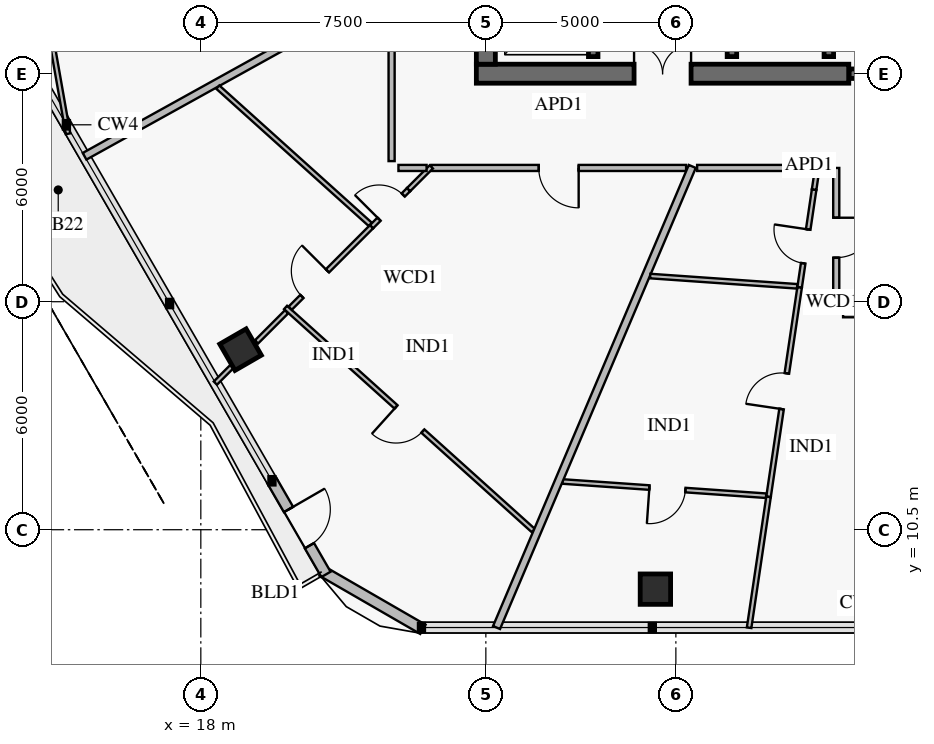
"""IFC4 building model, lengths in metres.
Left out: names, types, materials, properties, quantities, classifications, styles, units other than length and angle.
Written with IfcOpenShell. Run it as: python <this file> out.ifc"""

import sys

from ifc_helpers import new_model, si_unit, direction, frame, frame_2d, origin, origin_2d, place, context, subcontext, project, spatial, rectangle, extrude, element, fill, save


model = new_model("IFC4")
c1 = context("Model", 3, precision=1e-05, world=origin(), true_north=direction((0.0, 1.0)))
c2 = subcontext(c1, "Body", "Model", "MODEL_VIEW")
j1 = project(units=[si_unit("LENGTHUNIT", "METRE"), si_unit("PLANEANGLEUNIT", "RADIAN")], contexts=[c1])
p1 = place(None, origin())
s1 = spatial("IfcSite", under=j1, at=p1, CompositionType="ELEMENT")
p2 = place(p1, origin())
s2 = spatial("IfcBuilding", under=s1, at=p2, CompositionType="ELEMENT")
p3 = place(p2, frame((0.0, 0.0, 331.0)))
s3 = spatial("IfcBuildingStorey", under=s2, at=p3, CompositionType="ELEMENT", Elevation=331.0)
p4 = place(p3, frame((25.25, 22.5, 0.0), z_axis=(0.0, 0.0, 1.0), x_axis=(1.0, 0.0, 0.0)))
e1 = element("IfcWall", 1, at=p4, inside=s3, PredefinedType="SHEAR", context=c2, shape_type="SweptSolid", body=[
    extrude(rectangle(XDim=9.8, YDim=0.5, at=frame_2d((4.9, 0.0))), origin(), (0.0, 0.0, 1.0), 3.8),
])
p5 = place(p4, frame((4.15, 0.0, 0.0)))
e2 = element("IfcOpeningElement", 2, at=p5, cuts=e1, PredefinedType="OPENING", context=c2, shape_type="SweptSolid", body=[
    extrude(rectangle(XDim=1.5, YDim=2.15, at=frame_2d((0.75, 1.075))), frame((0.0, 0.262, 0.0), z_axis=(0.0, -1.0, 0.0), x_axis=(1.0, 0.0, 0.0)), (0.0, 0.0, 1.0), 0.524),
])
p6 = place(p3, frame((25.5, 22.75, 0.0), z_axis=(0.0, 0.0, 1.0), x_axis=(0.0, 1.0, 0.0)))
e3 = element("IfcWall", 3, at=p6, inside=s3, PredefinedType="SHEAR", context=c2, shape_type="SweptSolid", body=[
    extrude(rectangle(XDim=18.5, YDim=0.5, at=frame_2d((9.25, 0.0))), origin(), (0.0, 0.0, 1.0), 3.8),
])
p7 = place(p6, frame((9.0, 0.0, 0.0)))
e4 = element("IfcOpeningElement", 4, at=p7, cuts=e3, PredefinedType="OPENING", context=c2, shape_type="SweptSolid", body=[
    extrude(rectangle(XDim=1.1, YDim=2.15, at=frame_2d((0.55, 1.075))), frame((0.0, 0.262, 0.0), z_axis=(0.0, -1.0, 0.0), x_axis=(1.0, 0.0, 0.0)), (0.0, 0.0, 1.0), 0.524),
])
for number, where, z_axis, x_axis in (
    (5, (19.045, 15.238, 0.0), (0.0, 0.0, 1.0), (0.5, -0.866, 0.0)),
    (6, (29.961, 8.936, 0.0), (0.0, 0.0, 1.0), (1.0, 0.0, 0.0)),
):
    element("IfcColumn", number, at=place(p3, frame(where, z_axis=z_axis, x_axis=x_axis)), inside=s3, PredefinedType="COLUMN", context=c2, shape_type="SweptSolid", body=[
        extrude(rectangle(XDim=0.8, YDim=0.8, at=origin_2d()), origin(), (0.0, 0.0, 1.0), 3.55),
    ])
p8 = place(p3, frame((23.843, 7.878, 0.0), z_axis=(0.0, 0.0, 1.0), x_axis=(-0.866023752521, 0.50000286006, 0.0)))
e7 = element("IfcWall", 7, at=p8, inside=s3, PredefinedType="SOLIDWALL", context=c2, shape_type="SweptSolid", body=[
    extrude(rectangle(XDim=3.065, YDim=0.28, at=frame_2d((1.532, 0.0))), origin(), (0.0, 0.0, 1.0), 3.55),
])
p9 = place(p3, frame((21.293, 9.324, 0.0), z_axis=(0.0, 0.0, 1.0), x_axis=(-0.500007283403, 0.866021198669, 0.0)))
e8 = element("IfcWall", 8, at=p9, inside=s3, PredefinedType="SOLIDWALL", context=c2, shape_type="SweptSolid", body=[
    extrude(rectangle(XDim=2.844, YDim=0.28, at=frame_2d((1.422, 0.0))), origin(), (0.0, 0.0, 1.0), 3.55),
])
p10 = place(p9, frame((0.872, 0.0, 0.0)))
e9 = element("IfcOpeningElement", 9, at=p10, cuts=e8, PredefinedType="OPENING", context=c2, shape_type="SweptSolid", body=[
    extrude(rectangle(XDim=1.1, YDim=2.2, at=frame_2d((0.55, 1.1))), frame((0.0, 0.152, 0.0), z_axis=(0.0, -1.0, 0.0), x_axis=(1.0, 0.0, 0.0)), (0.0, 0.0, 1.0), 0.304),
])
p11 = place(p3, frame((35.06, 22.5, 0.0), z_axis=(0.0, 0.0, 1.0), x_axis=(1.0, 0.0, 0.0)))
e10 = element("IfcWall", 10, at=p11, inside=s3, PredefinedType="SOLIDWALL", context=c2, shape_type="SweptSolid", body=[
    extrude(rectangle(XDim=2.28, YDim=0.25, at=frame_2d((1.14, 0.0))), origin(), (0.0, 0.0, 1.0), 3.8),
])
p12 = place(p11, frame((0.39, 0.0, 0.0)))
e11 = element("IfcOpeningElement", 11, at=p12, cuts=e10, PredefinedType="OPENING", context=c2, shape_type="SweptSolid", body=[
    extrude(rectangle(XDim=1.5, YDim=2.15, at=frame_2d((0.75, 1.075))), frame((0.0, 0.137, 0.0), z_axis=(0.0, -1.0, 0.0), x_axis=(1.0, 0.0, 0.0)), (0.0, 0.0, 1.0), 0.274),
])
p13 = place(p3, frame((28.325, 22.95, 0.0), z_axis=(0.0, 0.0, 1.0), x_axis=(0.0, 1.0, 0.0)))
e12 = element("IfcWall", 12, at=p13, inside=s3, PredefinedType="SOLIDWALL", context=c2, shape_type="SweptSolid", body=[
    extrude(rectangle(XDim=8.2, YDim=0.25, at=frame_2d((4.1, 0.0))), origin(), (0.0, 0.0, 1.0), 3.8),
])
p14 = place(p13, frame((0.75, 0.0, 0.0)))
e13 = element("IfcOpeningElement", 13, at=p14, cuts=e12, PredefinedType="OPENING", context=c2, shape_type="SweptSolid", body=[
    extrude(rectangle(XDim=1.3, YDim=2.3, at=frame_2d((0.65, 1.15))), frame((0.0, 0.137, 0.0), z_axis=(0.0, -1.0, 0.0), x_axis=(1.0, 0.0, 0.0)), (0.0, 0.0, 1.0), 0.274),
])
p15 = place(p13, frame((3.78, 0.0, 0.0)))
e14 = element("IfcOpeningElement", 14, at=p15, cuts=e12, PredefinedType="OPENING", context=c2, shape_type="SweptSolid", body=[
    extrude(rectangle(XDim=0.9, YDim=2.1, at=frame_2d((0.45, 1.05))), frame((0.0, 0.137, 0.0), z_axis=(0.0, -1.0, 0.0), x_axis=(1.0, 0.0, 0.0)), (0.0, 0.0, 1.0), 0.274),
])
p16 = place(p13, frame((6.5, 0.0, 0.0)))
e15 = element("IfcOpeningElement", 15, at=p16, cuts=e12, PredefinedType="OPENING", context=c2, shape_type="SweptSolid", body=[
    extrude(rectangle(XDim=0.9, YDim=2.1, at=frame_2d((0.45, 1.05))), frame((0.0, 0.137, 0.0), z_axis=(0.0, -1.0, 0.0), x_axis=(1.0, 0.0, 0.0)), (0.0, 0.0, 1.0), 0.274),
])
p17 = place(p3, frame((31.975, 22.95, 0.0), z_axis=(0.0, 0.0, 1.0), x_axis=(0.0, 1.0, 0.0)))
e16 = element("IfcWall", 16, at=p17, inside=s3, PredefinedType="SOLIDWALL", context=c2, shape_type="SweptSolid", body=[
    extrude(rectangle(XDim=8.2, YDim=0.25, at=frame_2d((4.1, 0.0))), origin(), (0.0, 0.0, 1.0), 3.8),
])
p18 = place(p3, frame((34.525, 22.95, 0.0), z_axis=(0.0, 0.0, 1.0), x_axis=(0.0, 1.0, 0.0)))
e17 = element("IfcWall", 17, at=p18, inside=s3, PredefinedType="SOLIDWALL", context=c2, shape_type="SweptSolid", body=[
    extrude(rectangle(XDim=8.2, YDim=0.25, at=frame_2d((4.1, 0.0))), origin(), (0.0, 0.0, 1.0), 3.8),
])
p19 = place(p18, frame((1.45, 0.0, 0.0)))
e18 = element("IfcOpeningElement", 18, at=p19, cuts=e17, PredefinedType="OPENING", context=c2, shape_type="SweptSolid", body=[
    extrude(rectangle(XDim=0.9, YDim=2.1, at=frame_2d((0.45, 1.05))), frame((0.0, 0.137, 0.0), z_axis=(0.0, -1.0, 0.0), x_axis=(1.0, 0.0, 0.0)), (0.0, 0.0, 1.0), 0.274),
])
p20 = place(p18, frame((5.65, 0.0, 0.0)))
e19 = element("IfcOpeningElement", 19, at=p20, cuts=e17, PredefinedType="OPENING", context=c2, shape_type="SweptSolid", body=[
    extrude(rectangle(XDim=0.9, YDim=2.1, at=frame_2d((0.45, 1.05))), frame((0.0, 0.137, 0.0), z_axis=(0.0, -1.0, 0.0), x_axis=(1.0, 0.0, 0.0)), (0.0, 0.0, 1.0), 0.274),
])
p21 = place(p3, frame((13.064, 29.099, 0.0), z_axis=(0.0, 0.0, 1.0), x_axis=(0.173662921091, -0.984805153235, 0.0)))
e20 = element("IfcWall", 20, at=p21, inside=s3, PredefinedType="PARTITIONING", context=c2, shape_type="SweptSolid", body=[
    extrude(rectangle(XDim=8.306, YDim=0.12, at=frame_2d((4.153, 0.0))), origin(), (0.0, 0.0, 1.0), 2.97),
])
p22 = place(p21, frame((0.497, 0.0, 0.0)))
e21 = element("IfcOpeningElement", 21, at=p22, cuts=e20, PredefinedType="OPENING", context=c2, shape_type="SweptSolid", body=[
    extrude(rectangle(XDim=0.95, YDim=2.1, at=frame_2d((0.475, 1.05))), frame((0.0, 0.072, 0.0), z_axis=(0.0, -1.0, 0.0), x_axis=(1.0, 0.0, 0.0)), (0.0, 0.0, 1.0), 0.144),
])
p23 = place(p3, frame((20.229, 16.349, 0.0), z_axis=(0.0, 0.0, 1.0), x_axis=(0.743128113079, -0.669149166891, 0.0)))
e22 = element("IfcWall", 22, at=p23, inside=s3, PredefinedType="PARTITIONING", context=c2, shape_type="SweptSolid", body=[
    extrude(rectangle(XDim=8.775, YDim=0.12, at=frame_2d((4.388, 0.0))), origin(), (0.0, 0.0, 1.0), 2.97),
])
p24 = place(p23, frame((3.913, 0.0, 0.0)))
e23 = element("IfcOpeningElement", 23, at=p24, cuts=e22, PredefinedType="OPENING", context=c2, shape_type="SweptSolid", body=[
    extrude(rectangle(XDim=0.95, YDim=2.1, at=frame_2d((0.475, 1.05))), frame((0.0, 0.072, 0.0), z_axis=(0.0, -1.0, 0.0), x_axis=(1.0, 0.0, 0.0)), (0.0, 0.0, 1.0), 0.144),
])
p25 = place(p3, frame((23.467, 19.45, 0.0), z_axis=(0.0, 0.0, 1.0), x_axis=(-0.706576517607, -0.707636647416, 0.0)))
e24 = element("IfcWall", 24, at=p25, inside=s3, PredefinedType="PARTITIONING", context=c2, shape_type="SweptSolid", body=[
    extrude(rectangle(XDim=1.382, YDim=0.12, at=frame_2d((0.691, 0.0))), origin(), (0.0, 0.0, 1.0), 3.0),
])
p26 = place(p25, frame((0.2, 0.0, 0.0)))
e25 = element("IfcOpeningElement", 25, at=p26, cuts=e24, PredefinedType="OPENING", context=c2, shape_type="SweptSolid", body=[
    extrude(rectangle(XDim=0.9, YDim=2.1, at=frame_2d((0.45, 1.05))), frame((0.0, 0.072, 0.0), z_axis=(0.0, -1.0, 0.0), x_axis=(1.0, 0.0, 0.0)), (0.0, 0.0, 1.0), 0.144),
])
p27 = place(p3, frame((22.491, 18.472, 0.0), z_axis=(0.0, 0.0, 1.0), x_axis=(-0.706622737924, -0.707590493329, 0.0)))
e26 = element("IfcWall", 26, at=p27, inside=s3, PredefinedType="PARTITIONING", context=c2, shape_type="SweptSolid", body=[
    extrude(rectangle(XDim=3.027, YDim=0.12, at=frame_2d((1.514, 0.0))), origin(), (0.0, 0.0, 1.0), 3.0),
])
p28 = place(p27, frame((1.641, 0.0, 0.0)))
e27 = element("IfcOpeningElement", 27, at=p28, cuts=e26, PredefinedType="OPENING", context=c2, shape_type="SweptSolid", body=[
    extrude(rectangle(XDim=0.95, YDim=2.1, at=frame_2d((0.475, 1.05))), frame((0.0, 0.072, 0.0), z_axis=(0.0, -1.0, 0.0), x_axis=(1.0, 0.0, 0.0)), (0.0, 0.0, 1.0), 0.144),
])
p29 = place(p3, frame((20.256, 16.234, 0.0), z_axis=(0.0, 0.0, 1.0), x_axis=(-0.706560879492, -0.707652261758, 0.0)))
e28 = element("IfcWall", 28, at=p29, inside=s3, PredefinedType="PARTITIONING", context=c2, shape_type="SweptSolid", body=[
    extrude(rectangle(XDim=1.118, YDim=0.12, at=frame_2d((0.559, 0.0))), origin(), (0.0, 0.0, 1.0), 3.0),
])
p30 = place(p3, frame((24.065, 20.02, 0.0), z_axis=(0.0, 0.0, 1.0), x_axis=(1.0, 0.0, 0.0)))
e29 = element("IfcWall", 29, at=p30, inside=s3, PredefinedType="PARTITIONING", context=c2, shape_type="SweptSolid", body=[
    extrude(rectangle(XDim=6.704, YDim=0.16, at=frame_2d((3.352, 0.0))), origin(), (0.0, 0.0, 1.0), 3.55),
])
p31 = place(p30, frame((2.827, 0.0, 0.0)))
e30 = element("IfcOpeningElement", 30, at=p31, cuts=e29, PredefinedType="OPENING", context=c2, shape_type="SweptSolid", body=[
    extrude(rectangle(XDim=1.05, YDim=2.15, at=frame_2d((0.525, 1.075))), frame((0.0, 0.092, 0.0), z_axis=(0.0, -1.0, 0.0), x_axis=(1.0, 0.0, 0.0)), (0.0, 0.0, 1.0), 0.184),
])
p32 = place(p3, frame((34.138, 19.45, 0.0), z_axis=(0.0, 0.0, 1.0), x_axis=(-0.146698230723, -0.989181292334, 0.0)))
e31 = element("IfcWall", 31, at=p32, inside=s3, PredefinedType="PARTITIONING", context=c2, shape_type="SweptSolid", body=[
    extrude(rectangle(XDim=2.603, YDim=0.12, at=frame_2d((1.301, 0.0))), origin(), (0.0, 0.0, 1.0), 3.55),
])
p33 = place(p32, frame((1.06, 0.0, 0.0)))
e32 = element("IfcOpeningElement", 32, at=p33, cuts=e31, PredefinedType="OPENING", context=c2, shape_type="SweptSolid", body=[
    extrude(rectangle(XDim=0.9, YDim=2.1, at=frame_2d((0.45, 1.05))), frame((0.0, 0.072, 0.0), z_axis=(0.0, -1.0, 0.0), x_axis=(1.0, 0.0, 0.0)), (0.0, 0.0, 1.0), 0.144),
])
p34 = place(p3, frame((33.756, 16.875, 0.0), z_axis=(0.0, 0.0, 1.0), x_axis=(-0.146775791573, -0.989169786744, 0.0)))
e33 = element("IfcWall", 33, at=p34, inside=s3, PredefinedType="PARTITIONING", context=c2, shape_type="SweptSolid", body=[
    extrude(rectangle(XDim=5.571, YDim=0.12, at=frame_2d((2.785, 0.0))), origin(), (0.0, 0.0, 1.0), 3.2),
])
p35 = place(p34, frame((2.285, 0.0, 0.0)))
e34 = element("IfcOpeningElement", 34, at=p35, cuts=e33, PredefinedType="OPENING", context=c2, shape_type="SweptSolid", body=[
    extrude(rectangle(XDim=0.95, YDim=2.1, at=frame_2d((0.475, 1.05))), frame((0.0, 0.072, 0.0), z_axis=(0.0, -1.0, 0.0), x_axis=(1.0, 0.0, 0.0)), (0.0, 0.0, 1.0), 0.144),
])
p36 = place(p3, frame((27.512, 11.77, 0.0), z_axis=(0.0, 0.0, 1.0), x_axis=(0.997563205134, -0.06976855856, 0.0)))
e35 = element("IfcWall", 35, at=p36, inside=s3, PredefinedType="PARTITIONING", context=c2, shape_type="SweptSolid", body=[
    extrude(rectangle(XDim=5.375, YDim=0.12, at=frame_2d((2.688, 0.0))), origin(), (0.0, 0.0, 1.0), 3.0),
])
p37 = place(p36, frame((2.297, 0.0, 0.0)))
e36 = element("IfcOpeningElement", 36, at=p37, cuts=e35, PredefinedType="OPENING", context=c2, shape_type="SweptSolid", body=[
    extrude(rectangle(XDim=0.95, YDim=2.1, at=frame_2d((0.475, 1.05))), frame((0.0, 0.072, 0.0), z_axis=(0.0, -1.0, 0.0), x_axis=(1.0, 0.0, 0.0)), (0.0, 0.0, 1.0), 0.144),
])
p38 = place(p3, frame((34.72, 20.02, 0.0), z_axis=(0.0, 0.0, 1.0), x_axis=(0.0, -1.0, 0.0)))
e37 = element("IfcWall", 37, at=p38, inside=s3, PredefinedType="PARTITIONING", context=c2, shape_type="SweptSolid", body=[
    extrude(rectangle(XDim=3.67, YDim=0.16, at=frame_2d((1.835, 0.0))), origin(), (0.0, 0.0, 1.0), 3.55),
])
p39 = place(p38, frame((1.31, 0.0, 0.0)))
e38 = element("IfcOpeningElement", 38, at=p39, cuts=e37, PredefinedType="OPENING", context=c2, shape_type="SweptSolid", body=[
    extrude(rectangle(XDim=1.05, YDim=2.15, at=frame_2d((0.525, 1.075))), frame((0.0, 0.092, 0.0), z_axis=(0.0, -1.0, 0.0), x_axis=(1.0, 0.0, 0.0)), (0.0, 0.0, 1.0), 0.184),
])
p40 = place(p3, frame((23.06, 24.827, 0.0), z_axis=(0.0, 0.0, 1.0), x_axis=(-0.874625812901, -0.484798604998, 0.0)))
e39 = element("IfcWall", 39, at=p40, inside=s3, PredefinedType="PARTITIONING", context=c2, shape_type="SweptSolid", body=[
    extrude(rectangle(XDim=9.283, YDim=0.2, at=frame_2d((4.641, 0.0))), origin(), (0.0, 0.0, 1.0), 2.97),
])
p41 = place(p3, frame((24.065, 20.048, 0.0), z_axis=(0.0, 0.0, 1.0), x_axis=(-0.706673637798, -0.707539659413, 0.0)))
e40 = element("IfcWall", 40, at=p41, inside=s3, PredefinedType="PARTITIONING", context=c2, shape_type="SweptSolid", body=[
    extrude(rectangle(XDim=0.846, YDim=0.12, at=frame_2d((0.423, 0.0))), origin(), (0.0, 0.0, 1.0), 3.0),
])
p42 = place(p3, frame((18.842, 14.818, 0.0), z_axis=(0.0, 0.0, 1.0), x_axis=(-0.706543723632, -0.707669390744, 0.0)))
e41 = element("IfcWall", 41, at=p42, inside=s3, PredefinedType="PARTITIONING", context=c2, shape_type="SweptSolid", body=[
    extrude(rectangle(XDim=0.651, YDim=0.12, at=frame_2d((0.325, 0.0))), origin(), (0.0, 0.0, 1.0), 3.55),
])
p43 = place(p3, frame((18.447, 22.147, 0.0), z_axis=(0.0, 0.0, 1.0), x_axis=(0.743118679311, -0.669159643478, 0.0)))
e42 = element("IfcWall", 42, at=p43, inside=s3, PredefinedType="PARTITIONING", context=c2, shape_type="SweptSolid", body=[
    extrude(rectangle(XDim=5.397, YDim=0.12, at=frame_2d((2.699, 0.0))), origin(), (0.0, 0.0, 1.0), 3.0),
])
p44 = place(p3, frame((30.932, 20.06, 0.0), z_axis=(0.0, 0.0, 1.0), x_axis=(-0.390727247375, -0.920506500878, 0.0)))
e43 = element("IfcWall", 43, at=p44, inside=s3, PredefinedType="PARTITIONING", context=c2, shape_type="SweptSolid", body=[
    extrude(rectangle(XDim=13.182, YDim=0.2, at=frame_2d((6.591, 0.0))), origin(), (0.0, 0.0, 1.0), 2.97),
])
p45 = place(p3, frame((34.229, 20.065, 0.0), z_axis=(0.0, 0.0, 1.0), x_axis=(-0.146918808398, -0.989148554939, 0.0)))
e44 = element("IfcWall", 44, at=p45, inside=s3, PredefinedType="PARTITIONING", context=c2, shape_type="SweptSolid", body=[
    extrude(rectangle(XDim=0.622, YDim=0.12, at=frame_2d((0.311, 0.0))), origin(), (0.0, 0.0, 1.0), 3.55),
])
p46 = place(p3, frame((32.938, 11.365, 0.0), z_axis=(0.0, 0.0, 1.0), x_axis=(-0.146828188144, -0.989162010576, 0.0)))
e45 = element("IfcWall", 45, at=p46, inside=s3, PredefinedType="PARTITIONING", context=c2, shape_type="SweptSolid", body=[
    extrude(rectangle(XDim=3.482, YDim=0.12, at=frame_2d((1.741, 0.0))), origin(), (0.0, 0.0, 1.0), 2.97),
])
p47 = place(p3, frame((29.825, 17.175, 0.0), z_axis=(0.0, 0.0, 1.0), x_axis=(0.997561862018, -0.069787760015, 0.0)))
e46 = element("IfcWall", 46, at=p47, inside=s3, PredefinedType="PARTITIONING", context=c2, shape_type="SweptSolid", body=[
    extrude(rectangle(XDim=3.876, YDim=0.12, at=frame_2d((1.938, 0.0))), origin(), (0.0, 0.0, 1.0), 3.0),
])
p48 = place(p3, frame((23.02, 24.633, 0.0), z_axis=(0.0, 0.0, 1.0), x_axis=(0.0, -1.0, 0.0)))
e47 = element("IfcWall", 47, at=p48, inside=s3, PredefinedType="PARTITIONING", context=c2, shape_type="SweptSolid", body=[
    extrude(rectangle(XDim=4.433, YDim=0.16, at=frame_2d((2.217, 0.0))), origin(), (0.0, 0.0, 1.0), 3.55),
])
p49 = place(p3, frame((23.2, 20.02, 0.0), z_axis=(0.0, 0.0, 1.0), x_axis=(1.0, 0.0, 0.0)))
e48 = element("IfcWall", 48, at=p49, inside=s3, PredefinedType="PARTITIONING", context=c2, shape_type="SweptSolid", body=[
    extrude(rectangle(XDim=0.74, YDim=0.16, at=frame_2d((0.37, 0.0))), origin(), (0.0, 0.0, 1.0), 3.0),
])
p50 = place(p3, frame((34.9, 16.17, 0.0), z_axis=(0.0, 0.0, 1.0), x_axis=(1.0, 0.0, 0.0)))
e49 = element("IfcWall", 49, at=p50, inside=s3, PredefinedType="PARTITIONING", context=c2, shape_type="SweptSolid", body=[
    extrude(rectangle(XDim=2.2, YDim=0.16, at=frame_2d((1.1, 0.0))), origin(), (0.0, 0.0, 1.0), 3.55),
])
p51 = place(p3, frame((31.059, 20.02, 0.0), z_axis=(0.0, 0.0, 1.0), x_axis=(1.0, 0.0, 0.0)))
e50 = element("IfcWall", 50, at=p51, inside=s3, PredefinedType="PARTITIONING", context=c2, shape_type="SweptSolid", body=[
    extrude(rectangle(XDim=3.094, YDim=0.16, at=frame_2d((1.547, 0.0))), origin(), (0.0, 0.0, 1.0), 3.0),
])
p52 = place(p10, frame((1.1, 0.0, 0.0), z_axis=(0.0, 0.0, 1.0), x_axis=(-1.0, 0.0, 0.0)))
e51 = element("IfcDoor", 51, at=p52, inside=s3, OperationType="SINGLE_SWING_LEFT", PredefinedType="DOOR", context=c2, shape_type="SweptSolid", body=[
    extrude(rectangle(XDim=1.1, YDim=2.2, at=frame_2d((0.55, 1.1))), frame((0.0, 0.025, 0.0), z_axis=(0.0, -1.0, 0.0), x_axis=(1.0, 0.0, 0.0)), (0.0, 0.0, 1.0), 0.05),
])
fill(e9, e51)
p53 = place(p5, origin())
e52 = element("IfcDoor", 52, at=p53, inside=s3, OperationType="DOUBLE_DOOR_SINGLE_SWING", PredefinedType="DOOR", context=c2, shape_type="SweptSolid", body=[
    extrude(rectangle(XDim=1.5, YDim=2.15, at=frame_2d((0.75, 1.075))), frame((0.0, 0.025, 0.0), z_axis=(0.0, -1.0, 0.0), x_axis=(1.0, 0.0, 0.0)), (0.0, 0.0, 1.0), 0.05),
])
fill(e2, e52)
p54 = place(p24, frame((0.95, 0.0, 0.0), z_axis=(0.0, 0.0, 1.0), x_axis=(-1.0, 0.0, 0.0)))
e53 = element("IfcDoor", 53, at=p54, inside=s3, OperationType="SINGLE_SWING_RIGHT", PredefinedType="DOOR", context=c2, shape_type="SweptSolid", body=[
    extrude(rectangle(XDim=0.95, YDim=2.1, at=frame_2d((0.475, 1.05))), frame((0.0, 0.025, 0.0), z_axis=(0.0, -1.0, 0.0), x_axis=(1.0, 0.0, 0.0)), (0.0, 0.0, 1.0), 0.05),
])
fill(e23, e53)
p55 = place(p26, frame((0.9, 0.0, 0.0), z_axis=(0.0, 0.0, 1.0), x_axis=(-1.0, 0.0, 0.0)))
e54 = element("IfcDoor", 54, at=p55, inside=s3, OperationType="SINGLE_SWING_LEFT", PredefinedType="DOOR", context=c2, shape_type="SweptSolid", body=[
    extrude(rectangle(XDim=0.9, YDim=2.1, at=frame_2d((0.45, 1.05))), frame((0.0, 0.025, 0.0), z_axis=(0.0, -1.0, 0.0), x_axis=(1.0, 0.0, 0.0)), (0.0, 0.0, 1.0), 0.05),
])
fill(e25, e54)
p56 = place(p28, frame((0.95, 0.0, 0.0), z_axis=(0.0, 0.0, 1.0), x_axis=(-1.0, 0.0, 0.0)))
e55 = element("IfcDoor", 55, at=p56, inside=s3, OperationType="SINGLE_SWING_RIGHT", PredefinedType="DOOR", context=c2, shape_type="SweptSolid", body=[
    extrude(rectangle(XDim=0.95, YDim=2.1, at=frame_2d((0.475, 1.05))), frame((0.0, 0.025, 0.0), z_axis=(0.0, -1.0, 0.0), x_axis=(1.0, 0.0, 0.0)), (0.0, 0.0, 1.0), 0.05),
])
fill(e27, e55)
p57 = place(p31, frame((1.05, 0.0, 0.0), z_axis=(0.0, 0.0, 1.0), x_axis=(-1.0, 0.0, 0.0)))
e56 = element("IfcDoor", 56, at=p57, inside=s3, OperationType="SINGLE_SWING_LEFT", PredefinedType="DOOR", context=c2, shape_type="SweptSolid", body=[
    extrude(rectangle(XDim=1.05, YDim=2.15, at=frame_2d((0.525, 1.075))), frame((0.0, 0.025, 0.0), z_axis=(0.0, -1.0, 0.0), x_axis=(1.0, 0.0, 0.0)), (0.0, 0.0, 1.0), 0.05),
])
fill(e30, e56)
p58 = place(p33, frame((0.9, 0.0, 0.0), z_axis=(0.0, 0.0, 1.0), x_axis=(-1.0, 0.0, 0.0)))
e57 = element("IfcDoor", 57, at=p58, inside=s3, OperationType="SINGLE_SWING_RIGHT", PredefinedType="DOOR", context=c2, shape_type="SweptSolid", body=[
    extrude(rectangle(XDim=0.9, YDim=2.1, at=frame_2d((0.45, 1.05))), frame((0.0, 0.025, 0.0), z_axis=(0.0, -1.0, 0.0), x_axis=(1.0, 0.0, 0.0)), (0.0, 0.0, 1.0), 0.05),
])
fill(e32, e57)
p59 = place(p35, frame((0.95, 0.0, 0.0), z_axis=(0.0, 0.0, 1.0), x_axis=(-1.0, 0.0, 0.0)))
e58 = element("IfcDoor", 58, at=p59, inside=s3, OperationType="SINGLE_SWING_LEFT", PredefinedType="DOOR", context=c2, shape_type="SweptSolid", body=[
    extrude(rectangle(XDim=0.95, YDim=2.1, at=frame_2d((0.475, 1.05))), frame((0.0, 0.025, 0.0), z_axis=(0.0, -1.0, 0.0), x_axis=(1.0, 0.0, 0.0)), (0.0, 0.0, 1.0), 0.05),
])
fill(e34, e58)
p60 = place(p37, frame((0.95, 0.0, 0.0), z_axis=(0.0, 0.0, 1.0), x_axis=(-1.0, 0.0, 0.0)))
e59 = element("IfcDoor", 59, at=p60, inside=s3, OperationType="SINGLE_SWING_RIGHT", PredefinedType="DOOR", context=c2, shape_type="SweptSolid", body=[
    extrude(rectangle(XDim=0.95, YDim=2.1, at=frame_2d((0.475, 1.05))), frame((0.0, 0.025, 0.0), z_axis=(0.0, -1.0, 0.0), x_axis=(1.0, 0.0, 0.0)), (0.0, 0.0, 1.0), 0.05),
])
fill(e36, e59)
p61 = place(p39, origin())
e60 = element("IfcDoor", 60, at=p61, inside=s3, OperationType="SINGLE_SWING_LEFT", PredefinedType="DOOR", context=c2, shape_type="SweptSolid", body=[
    extrude(rectangle(XDim=1.05, YDim=2.15, at=frame_2d((0.525, 1.075))), frame((0.0, 0.025, 0.0), z_axis=(0.0, -1.0, 0.0), x_axis=(1.0, 0.0, 0.0)), (0.0, 0.0, 1.0), 0.05),
])
fill(e38, e60)
save(model, sys.argv[1])
